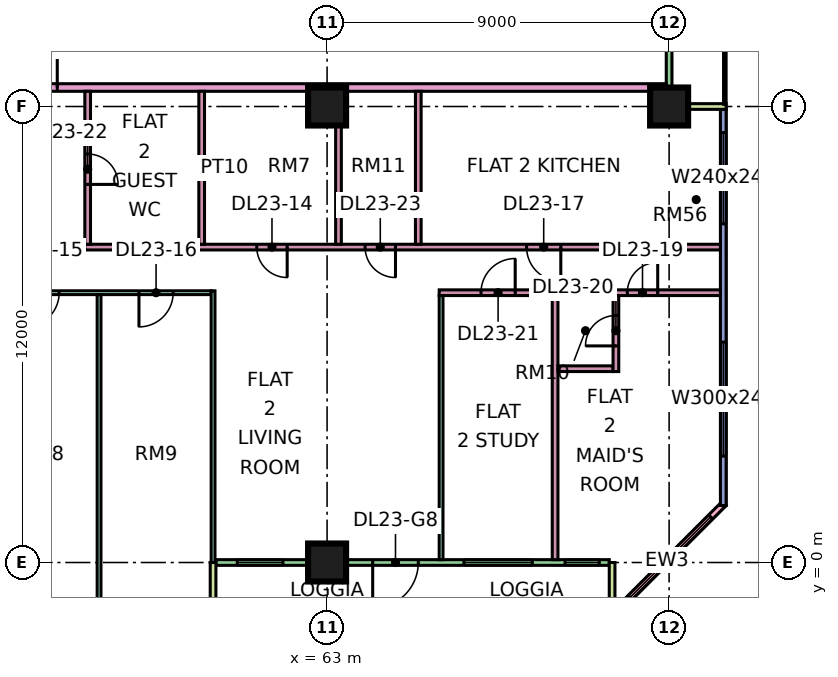
"""IFC4 building model, lengths in metres.
Left out: names, types, materials, properties, quantities, classifications, styles, units other than length and angle.
Written with IfcOpenShell. Run it as: python <this file> out.ifc"""

import sys

from ifc_helpers import new_model, si_unit, direction, frame, frame_2d, origin, origin_2d, place, context, subcontext, project, spatial, rectangle, extrude, element, fill, save


model = new_model("IFC4")
c1 = context("Model", 3, precision=1e-05, world=origin(), true_north=direction((0.0, 1.0)))
c2 = subcontext(c1, "Body", "Model", "MODEL_VIEW")
j1 = project(units=[si_unit("LENGTHUNIT", "METRE"), si_unit("PLANEANGLEUNIT", "RADIAN")], contexts=[c1])
p1 = place(None, origin())
s1 = spatial("IfcSite", under=j1, at=p1, CompositionType="ELEMENT")
p2 = place(p1, origin())
s2 = spatial("IfcBuilding", under=s1, at=p2, CompositionType="ELEMENT")
p3 = place(p2, frame((0.0, 0.0, 103.15)))
s3 = spatial("IfcBuildingStorey", under=s2, at=p3, CompositionType="ELEMENT", Elevation=103.15)
for number, where, z_axis, x_axis in (
    (1, (63.0, 0.0, 0.0), (0.0, 0.0, 1.0), (1.0, 0.0, 0.0)),
    (2, (63.0, 12.0, 0.0), (0.0, 0.0, 1.0), (1.0, 0.0, 0.0)),
    (3, (72.0, 12.0, 0.0), (0.0, 0.0, 1.0), (1.0, 0.0, 0.0)),
):
    element("IfcColumn", number, at=place(p3, frame(where, z_axis=z_axis, x_axis=x_axis)), inside=s3, PredefinedType="COLUMN", context=c2, shape_type="SweptSolid", body=[
        extrude(rectangle(XDim=1.0, YDim=1.0, at=origin_2d()), origin(), (0.0, 0.0, 1.0), 3.75),
    ])
p4 = place(p3, frame((60.075, 0.0, 0.0), z_axis=(0.0, 0.0, 1.0), x_axis=(1.0, 0.0, 0.0)))
e4 = element("IfcWall", 4, at=p4, inside=s3, PredefinedType="SOLIDWALL", context=c2, shape_type="SweptSolid", body=[
    extrude(rectangle(XDim=10.35, YDim=0.15, at=frame_2d((5.175, 0.0))), origin(), (0.0, 0.0, 1.0), 3.35),
])
p5 = place(p4, frame((0.562, 0.0, 0.45)))
e5 = element("IfcOpeningElement", 5, at=p5, cuts=e4, PredefinedType="OPENING", context=c2, shape_type="SweptSolid", body=[
    extrude(rectangle(XDim=1.2, YDim=2.4, at=frame_2d((0.6, 1.2))), frame((0.0, 0.085, 0.0), z_axis=(0.0, -1.0, 0.0), x_axis=(1.0, 0.0, 0.0)), (0.0, 0.0, 1.0), 0.17),
])
p6 = place(p4, frame((4.125, 0.0, 0.0)))
e6 = element("IfcOpeningElement", 6, at=p6, cuts=e4, PredefinedType="OPENING", context=c2, shape_type="SweptSolid", body=[
    extrude(rectangle(XDim=1.2, YDim=2.4, at=frame_2d((0.6, 1.2))), frame((0.0, 0.085, 0.0), z_axis=(0.0, -1.0, 0.0), x_axis=(1.0, 0.0, 0.0)), (0.0, 0.0, 1.0), 0.17),
])
p7 = place(p4, frame((6.525, 0.0, 0.45)))
e7 = element("IfcOpeningElement", 7, at=p7, cuts=e4, PredefinedType="OPENING", context=c2, shape_type="SweptSolid", body=[
    extrude(rectangle(XDim=1.8, YDim=2.4, at=frame_2d((0.9, 1.2))), frame((0.0, 0.085, 0.0), z_axis=(0.0, -1.0, 0.0), x_axis=(1.0, 0.0, 0.0)), (0.0, 0.0, 1.0), 0.17),
])
p8 = place(p4, frame((9.188, 0.0, 0.45)))
e8 = element("IfcOpeningElement", 8, at=p8, cuts=e4, PredefinedType="OPENING", context=c2, shape_type="SweptSolid", body=[
    extrude(rectangle(XDim=0.9, YDim=2.4, at=frame_2d((0.45, 1.2))), frame((0.0, 0.085, 0.0), z_axis=(0.0, -1.0, 0.0), x_axis=(1.0, 0.0, 0.0)), (0.0, 0.0, 1.0), 0.17),
])
for number, where, z_axis, x_axis in (
    (9, (60.0, -1.5, 0.0), (0.0, 0.0, 1.0), (0.0, 1.0, 0.0)),
    (10, (70.5, -1.5, 0.0), (0.0, 0.0, 1.0), (0.0, 1.0, 0.0)),
):
    element("IfcWall", number, at=place(p3, frame(where, z_axis=z_axis, x_axis=x_axis)), inside=s3, PredefinedType="SOLIDWALL", context=c2, shape_type="SweptSolid", body=[
        extrude(rectangle(XDim=1.5, YDim=0.15, at=frame_2d((0.75, 0.0))), origin(), (0.0, 0.0, 1.0), 3.35),
    ])
p9 = place(p3, frame((70.447, -1.447, 0.0), z_axis=(0.0, 0.0, 1.0), x_axis=(0.707106781187, 0.707106781187, 0.0)))
e11 = element("IfcWall", 11, at=p9, inside=s3, PredefinedType="SOLIDWALL", context=c2, shape_type="SweptSolid", body=[
    extrude(rectangle(XDim=4.243, YDim=0.15, at=frame_2d((2.121, 0.0))), origin(), (0.0, 0.0, 1.0), 3.35),
])
p10 = place(p9, frame((0.744, 0.0, 0.45)))
e12 = element("IfcOpeningElement", 12, at=p10, cuts=e11, PredefinedType="OPENING", context=c2, shape_type="SweptSolid", body=[
    extrude(rectangle(XDim=3.0, YDim=2.4, at=frame_2d((1.5, 1.2))), frame((0.0, 0.085, 0.0), z_axis=(0.0, -1.0, 0.0), x_axis=(1.0, 0.0, 0.0)), (0.0, 0.0, 1.0), 0.17),
])
p11 = place(p3, frame((73.425, 1.5, 0.0), z_axis=(0.0, 0.0, 1.0), x_axis=(0.0, 1.0, 0.0)))
e13 = element("IfcWall", 13, at=p11, inside=s3, PredefinedType="SOLIDWALL", context=c2, shape_type="SweptSolid", body=[
    extrude(rectangle(XDim=10.425, YDim=0.15, at=frame_2d((5.212, 0.0))), origin(), (0.0, 0.0, 1.0), 3.35),
])
p12 = place(p11, frame((1.3, 0.0, 0.45)))
e14 = element("IfcOpeningElement", 14, at=p12, cuts=e13, PredefinedType="OPENING", context=c2, shape_type="SweptSolid", body=[
    extrude(rectangle(XDim=3.0, YDim=2.4, at=frame_2d((1.5, 1.2))), frame((0.0, 0.085, 0.0), z_axis=(0.0, -1.0, 0.0), x_axis=(1.0, 0.0, 0.0)), (0.0, 0.0, 1.0), 0.17),
])
p13 = place(p11, frame((7.413, 0.0, 0.45)))
e15 = element("IfcOpeningElement", 15, at=p13, cuts=e13, PredefinedType="OPENING", context=c2, shape_type="SweptSolid", body=[
    extrude(rectangle(XDim=2.4, YDim=2.4, at=frame_2d((1.2, 1.2))), frame((0.0, 0.085, 0.0), z_axis=(0.0, -1.0, 0.0), x_axis=(1.0, 0.0, 0.0)), (0.0, 0.0, 1.0), 0.17),
])
p14 = place(p3, frame((72.0, 12.075, 0.0), z_axis=(0.0, 0.0, 1.0), x_axis=(0.0, 1.0, 0.0)))
e16 = element("IfcWall", 16, at=p14, inside=s3, PredefinedType="SOLIDWALL", context=c2, shape_type="SweptSolid", body=[
    extrude(rectangle(XDim=10.35, YDim=0.15, at=frame_2d((5.175, 0.0))), origin(), (0.0, 0.0, 1.0), 3.35),
])
p15 = place(p14, frame((4.575, 0.0, 0.0)))
e17 = element("IfcOpeningElement", 17, at=p15, cuts=e16, PredefinedType="OPENING", context=c2, shape_type="SweptSolid", body=[
    extrude(rectangle(XDim=1.8, YDim=2.4, at=frame_2d((0.9, 1.2))), frame((0.0, 0.085, 0.0), z_axis=(0.0, -1.0, 0.0), x_axis=(1.0, 0.0, 0.0)), (0.0, 0.0, 1.0), 0.17),
])
p16 = place(p14, frame((7.988, 0.0, 0.45)))
e18 = element("IfcOpeningElement", 18, at=p16, cuts=e16, PredefinedType="OPENING", context=c2, shape_type="SweptSolid", body=[
    extrude(rectangle(XDim=1.8, YDim=2.4, at=frame_2d((0.9, 1.2))), frame((0.0, 0.085, 0.0), z_axis=(0.0, -1.0, 0.0), x_axis=(1.0, 0.0, 0.0)), (0.0, 0.0, 1.0), 0.17),
])
p17 = place(p3, frame((73.5, 12.0, 0.0), z_axis=(0.0, 0.0, 1.0), x_axis=(-1.0, 0.0, 0.0)))
e19 = element("IfcWall", 19, at=p17, inside=s3, PredefinedType="SOLIDWALL", context=c2, shape_type="SweptSolid", body=[
    extrude(rectangle(XDim=1.5, YDim=0.15, at=frame_2d((0.75, 0.0))), origin(), (0.0, 0.0, 1.0), 3.35),
])
p18 = place(p3, frame((40.65, 12.5, 0.0), z_axis=(0.0, 0.0, 1.0), x_axis=(1.0, 0.0, 0.0)))
e20 = element("IfcWall", 20, at=p18, inside=s3, PredefinedType="PARTITIONING", context=c2, shape_type="SweptSolid", body=[
    extrude(rectangle(XDim=31.276, YDim=0.2, at=frame_2d((15.638, 0.0))), origin(), (0.0, 0.0, 1.0), 3.35),
])
p19 = place(p18, frame((14.25, 0.0, 0.0)))
e21 = element("IfcOpeningElement", 21, at=p19, cuts=e20, PredefinedType="OPENING", context=c2, shape_type="SweptSolid", body=[
    extrude(rectangle(XDim=1.0, YDim=2.1, at=frame_2d((0.5, 1.05))), frame((0.0, 0.11, 0.0), z_axis=(0.0, -1.0, 0.0), x_axis=(1.0, 0.0, 0.0)), (0.0, 0.0, 1.0), 0.22),
])
p20 = place(p18, frame((1.05, 0.0, 0.0)))
e22 = element("IfcOpeningElement", 22, at=p20, cuts=e20, PredefinedType="OPENING", context=c2, shape_type="SweptSolid", body=[
    extrude(rectangle(XDim=1.0, YDim=2.1, at=frame_2d((0.5, 1.05))), frame((0.0, 0.11, 0.0), z_axis=(0.0, -1.0, 0.0), x_axis=(1.0, 0.0, 0.0)), (0.0, 0.0, 1.0), 0.22),
])
p21 = place(p3, frame((54.1, 7.1, 0.0), z_axis=(0.0, 0.0, 1.0), x_axis=(1.0, 0.0, 0.0)))
e23 = element("IfcWall", 23, at=p21, inside=s3, PredefinedType="PARTITIONING", context=c2, shape_type="SweptSolid", body=[
    extrude(rectangle(XDim=5.85, YDim=0.1, at=frame_2d((2.925, 0.0))), origin(), (0.0, 0.0, 1.0), 3.35),
])
p22 = place(p21, frame((0.95, 0.0, 0.0)))
e24 = element("IfcOpeningElement", 24, at=p22, cuts=e23, PredefinedType="OPENING", context=c2, shape_type="SweptSolid", body=[
    extrude(rectangle(XDim=0.9, YDim=2.1, at=frame_2d((0.45, 1.05))), frame((0.0, 0.06, 0.0), z_axis=(0.0, -1.0, 0.0), x_axis=(1.0, 0.0, 0.0)), (0.0, 0.0, 1.0), 0.12),
])
p23 = place(p21, frame((3.95, 0.0, 0.0)))
e25 = element("IfcOpeningElement", 25, at=p23, cuts=e23, PredefinedType="OPENING", context=c2, shape_type="SweptSolid", body=[
    extrude(rectangle(XDim=0.9, YDim=2.1, at=frame_2d((0.45, 1.05))), frame((0.0, 0.06, 0.0), z_axis=(0.0, -1.0, 0.0), x_axis=(1.0, 0.0, 0.0)), (0.0, 0.0, 1.0), 0.12),
])
p24 = place(p3, frame((56.625, 8.3, 0.0), z_axis=(0.0, 0.0, 1.0), x_axis=(1.0, 0.0, 0.0)))
e26 = element("IfcWall", 26, at=p24, inside=s3, PredefinedType="PARTITIONING", context=c2, shape_type="SweptSolid", body=[
    extrude(rectangle(XDim=16.725, YDim=0.15, at=frame_2d((8.363, 0.0))), origin(), (0.0, 0.0, 1.0), 3.35),
])
p25 = place(p24, frame((4.525, 0.0, 0.0)))
e27 = element("IfcOpeningElement", 27, at=p25, cuts=e26, PredefinedType="OPENING", context=c2, shape_type="SweptSolid", body=[
    extrude(rectangle(XDim=0.8, YDim=2.1, at=frame_2d((0.4, 1.05))), frame((0.0, 0.085, 0.0), z_axis=(0.0, -1.0, 0.0), x_axis=(1.0, 0.0, 0.0)), (0.0, 0.0, 1.0), 0.17),
])
p26 = place(p24, frame((11.625, 0.0, 0.0)))
e28 = element("IfcOpeningElement", 28, at=p26, cuts=e26, PredefinedType="OPENING", context=c2, shape_type="SweptSolid", body=[
    extrude(rectangle(XDim=0.9, YDim=2.1, at=frame_2d((0.45, 1.05))), frame((0.0, 0.085, 0.0), z_axis=(0.0, -1.0, 0.0), x_axis=(1.0, 0.0, 0.0)), (0.0, 0.0, 1.0), 0.17),
])
p27 = place(p24, frame((7.375, 0.0, 0.0)))
e29 = element("IfcOpeningElement", 29, at=p27, cuts=e26, PredefinedType="OPENING", context=c2, shape_type="SweptSolid", body=[
    extrude(rectangle(XDim=0.8, YDim=2.1, at=frame_2d((0.4, 1.05))), frame((0.0, 0.085, 0.0), z_axis=(0.0, -1.0, 0.0), x_axis=(1.0, 0.0, 0.0)), (0.0, 0.0, 1.0), 0.17),
])
p28 = place(p3, frame((56.7, 8.375, 0.0), z_axis=(0.0, 0.0, 1.0), x_axis=(0.0, 1.0, 0.0)))
e30 = element("IfcWall", 30, at=p28, inside=s3, PredefinedType="PARTITIONING", context=c2, shape_type="SweptSolid", body=[
    extrude(rectangle(XDim=4.025, YDim=0.15, at=frame_2d((2.012, 0.0))), origin(), (0.0, 0.0, 1.0), 3.35),
])
p29 = place(p28, frame((1.575, 0.0, 0.0)))
e31 = element("IfcOpeningElement", 31, at=p29, cuts=e30, PredefinedType="OPENING", context=c2, shape_type="SweptSolid", body=[
    extrude(rectangle(XDim=0.8, YDim=2.1, at=frame_2d((0.4, 1.05))), frame((0.0, 0.085, 0.0), z_axis=(0.0, -1.0, 0.0), x_axis=(1.0, 0.0, 0.0)), (0.0, 0.0, 1.0), 0.17),
])
p30 = place(p3, frame((57.0, -1.351, 0.0), z_axis=(0.0, 0.0, 1.0), x_axis=(0.0, 1.0, 0.0)))
e32 = element("IfcWall", 32, at=p30, inside=s3, PredefinedType="PARTITIONING", context=c2, shape_type="SweptSolid", body=[
    extrude(rectangle(XDim=8.401, YDim=0.1, at=frame_2d((4.201, 0.0))), origin(), (0.0, 0.0, 1.0), 3.35),
])
p31 = place(p3, frame((59.7, 8.375, 0.0), z_axis=(0.0, 0.0, 1.0), x_axis=(0.0, 1.0, 0.0)))
e33 = element("IfcWall", 33, at=p31, inside=s3, PredefinedType="PARTITIONING", context=c2, shape_type="SweptSolid", body=[
    extrude(rectangle(XDim=4.025, YDim=0.15, at=frame_2d((2.012, 0.0))), origin(), (0.0, 0.0, 1.0), 3.35),
])
p32 = place(p3, frame((60.0, 0.0, 0.0), z_axis=(0.0, 0.0, 1.0), x_axis=(0.0, 1.0, 0.0)))
e34 = element("IfcWall", 34, at=p32, inside=s3, PredefinedType="PARTITIONING", context=c2, shape_type="SweptSolid", body=[
    extrude(rectangle(XDim=7.15, YDim=0.1, at=frame_2d((3.575, 0.0))), origin(), (0.0, 0.0, 1.0), 3.35),
])
for number, where, z_axis, x_axis in (
    (35, (63.3, 8.375, 0.0), (0.0, 0.0, 1.0), (0.0, 1.0, 0.0)),
    (36, (65.4, 8.375, 0.0), (0.0, 0.0, 1.0), (0.0, 1.0, 0.0)),
):
    element("IfcWall", number, at=place(p3, frame(where, z_axis=z_axis, x_axis=x_axis)), inside=s3, PredefinedType="PARTITIONING", context=c2, shape_type="SweptSolid", body=[
        extrude(rectangle(XDim=4.025, YDim=0.15, at=frame_2d((2.012, 0.0))), origin(), (0.0, 0.0, 1.0), 3.35),
    ])
p33 = place(p3, frame((65.95, 7.1, 0.0), z_axis=(0.0, 0.0, 1.0), x_axis=(1.0, 0.0, 0.0)))
e37 = element("IfcWall", 37, at=p33, inside=s3, PredefinedType="PARTITIONING", context=c2, shape_type="SweptSolid", body=[
    extrude(rectangle(XDim=7.4, YDim=0.15, at=frame_2d((3.7, 0.0))), origin(), (0.0, 0.0, 1.0), 3.35),
])
p34 = place(p33, frame((4.95, 0.0, 0.0)))
e38 = element("IfcOpeningElement", 38, at=p34, cuts=e37, PredefinedType="OPENING", context=c2, shape_type="SweptSolid", body=[
    extrude(rectangle(XDim=0.8, YDim=2.1, at=frame_2d((0.4, 1.05))), frame((0.0, 0.085, 0.0), z_axis=(0.0, -1.0, 0.0), x_axis=(1.0, 0.0, 0.0)), (0.0, 0.0, 1.0), 0.17),
])
p35 = place(p33, frame((1.1, 0.0, 0.0)))
e39 = element("IfcOpeningElement", 39, at=p35, cuts=e37, PredefinedType="OPENING", context=c2, shape_type="SweptSolid", body=[
    extrude(rectangle(XDim=0.9, YDim=2.1, at=frame_2d((0.45, 1.05))), frame((0.0, 0.085, 0.0), z_axis=(0.0, -1.0, 0.0), x_axis=(1.0, 0.0, 0.0)), (0.0, 0.0, 1.0), 0.17),
])
p36 = place(p3, frame((66.0, 0.074, 0.0), z_axis=(0.0, 0.0, 1.0), x_axis=(0.0, 1.0, 0.0)))
e40 = element("IfcWall", 40, at=p36, inside=s3, PredefinedType="PARTITIONING", context=c2, shape_type="SweptSolid", body=[
    extrude(rectangle(XDim=6.951, YDim=0.1, at=frame_2d((3.476, 0.0))), origin(), (0.0, 0.0, 1.0), 3.35),
])
p37 = place(p3, frame((69.0, 0.074, 0.0), z_axis=(0.0, 0.0, 1.0), x_axis=(0.0, 1.0, 0.0)))
e41 = element("IfcWall", 41, at=p37, inside=s3, PredefinedType="PARTITIONING", context=c2, shape_type="SweptSolid", body=[
    extrude(rectangle(XDim=6.951, YDim=0.15, at=frame_2d((3.476, 0.0))), origin(), (0.0, 0.0, 1.0), 3.35),
])
p38 = place(p3, frame((69.075, 5.1, 0.0), z_axis=(0.0, 0.0, 1.0), x_axis=(1.0, 0.0, 0.0)))
e42 = element("IfcWall", 42, at=p38, inside=s3, PredefinedType="PARTITIONING", context=c2, shape_type="SweptSolid", body=[
    extrude(rectangle(XDim=1.45, YDim=0.15, at=frame_2d((0.725, 0.0))), origin(), (0.0, 0.0, 1.0), 3.35),
])
p39 = place(p3, frame((70.6, 5.025, 0.0), z_axis=(0.0, 0.0, 1.0), x_axis=(0.0, 1.0, 0.0)))
e43 = element("IfcWall", 43, at=p39, inside=s3, PredefinedType="PARTITIONING", context=c2, shape_type="SweptSolid", body=[
    extrude(rectangle(XDim=2.0, YDim=0.15, at=frame_2d((1.0, 0.0))), origin(), (0.0, 0.0, 1.0), 3.35),
])
p40 = place(p39, frame((0.675, 0.0, 0.0)))
e44 = element("IfcOpeningElement", 44, at=p40, cuts=e43, PredefinedType="OPENING", context=c2, shape_type="SweptSolid", body=[
    extrude(rectangle(XDim=0.8, YDim=2.1, at=frame_2d((0.4, 1.05))), frame((0.0, 0.085, 0.0), z_axis=(0.0, -1.0, 0.0), x_axis=(1.0, 0.0, 0.0)), (0.0, 0.0, 1.0), 0.17),
])
p41 = place(p5, origin())
e45 = element("IfcWindow", 45, at=p41, inside=s3, PartitioningType="SINGLE_PANEL", PredefinedType="WINDOW", context=c2, shape_type="SweptSolid", body=[
    extrude(rectangle(XDim=1.2, YDim=2.4, at=frame_2d((0.6, 1.2))), frame((0.0, 0.03, 0.0), z_axis=(0.0, -1.0, 0.0), x_axis=(1.0, 0.0, 0.0)), (0.0, 0.0, 1.0), 0.06),
])
fill(e5, e45)
p42 = place(p6, frame((1.2, 0.0, 0.0), z_axis=(0.0, 0.0, 1.0), x_axis=(-1.0, 0.0, 0.0)))
e46 = element("IfcDoor", 46, at=p42, inside=s3, OperationType="DOUBLE_DOOR_SINGLE_SWING", PredefinedType="DOOR", context=c2, shape_type="SweptSolid", body=[
    extrude(rectangle(XDim=1.2, YDim=2.4, at=frame_2d((0.6, 1.2))), frame((0.0, 0.025, 0.0), z_axis=(0.0, -1.0, 0.0), x_axis=(1.0, 0.0, 0.0)), (0.0, 0.0, 1.0), 0.05),
])
fill(e6, e46)
p43 = place(p7, origin())
e47 = element("IfcWindow", 47, at=p43, inside=s3, PartitioningType="SINGLE_PANEL", PredefinedType="WINDOW", context=c2, shape_type="SweptSolid", body=[
    extrude(rectangle(XDim=1.8, YDim=2.4, at=frame_2d((0.9, 1.2))), frame((0.0, 0.03, 0.0), z_axis=(0.0, -1.0, 0.0), x_axis=(1.0, 0.0, 0.0)), (0.0, 0.0, 1.0), 0.06),
])
fill(e7, e47)
p44 = place(p8, origin())
e48 = element("IfcWindow", 48, at=p44, inside=s3, PartitioningType="SINGLE_PANEL", PredefinedType="WINDOW", context=c2, shape_type="SweptSolid", body=[
    extrude(rectangle(XDim=0.9, YDim=2.4, at=frame_2d((0.45, 1.2))), frame((0.0, 0.03, 0.0), z_axis=(0.0, -1.0, 0.0), x_axis=(1.0, 0.0, 0.0)), (0.0, 0.0, 1.0), 0.06),
])
fill(e8, e48)
p45 = place(p10, origin())
e49 = element("IfcWindow", 49, at=p45, inside=s3, PartitioningType="SINGLE_PANEL", PredefinedType="WINDOW", context=c2, shape_type="SweptSolid", body=[
    extrude(rectangle(XDim=3.0, YDim=2.4, at=frame_2d((1.5, 1.2))), frame((0.0, 0.03, 0.0), z_axis=(0.0, -1.0, 0.0), x_axis=(1.0, 0.0, 0.0)), (0.0, 0.0, 1.0), 0.06),
])
fill(e12, e49)
p46 = place(p12, origin())
e50 = element("IfcWindow", 50, at=p46, inside=s3, PartitioningType="SINGLE_PANEL", PredefinedType="WINDOW", context=c2, shape_type="SweptSolid", body=[
    extrude(rectangle(XDim=3.0, YDim=2.4, at=frame_2d((1.5, 1.2))), frame((0.0, 0.03, 0.0), z_axis=(0.0, -1.0, 0.0), x_axis=(1.0, 0.0, 0.0)), (0.0, 0.0, 1.0), 0.06),
])
fill(e14, e50)
p47 = place(p13, origin())
e51 = element("IfcWindow", 51, at=p47, inside=s3, PartitioningType="SINGLE_PANEL", PredefinedType="WINDOW", context=c2, shape_type="SweptSolid", body=[
    extrude(rectangle(XDim=2.4, YDim=2.4, at=frame_2d((1.2, 1.2))), frame((0.0, 0.03, 0.0), z_axis=(0.0, -1.0, 0.0), x_axis=(1.0, 0.0, 0.0)), (0.0, 0.0, 1.0), 0.06),
])
fill(e15, e51)
p48 = place(p25, origin())
e52 = element("IfcDoor", 52, at=p48, inside=s3, OperationType="SINGLE_SWING_RIGHT", PredefinedType="DOOR", context=c2, shape_type="SweptSolid", body=[
    extrude(rectangle(XDim=0.8, YDim=2.1, at=frame_2d((0.4, 1.05))), frame((0.0, 0.025, 0.0), z_axis=(0.0, -1.0, 0.0), x_axis=(1.0, 0.0, 0.0)), (0.0, 0.0, 1.0), 0.05),
])
fill(e27, e52)
p49 = place(p22, frame((0.9, 0.0, 0.0), z_axis=(0.0, 0.0, 1.0), x_axis=(-1.0, 0.0, 0.0)))
e53 = element("IfcDoor", 53, at=p49, inside=s3, OperationType="SINGLE_SWING_LEFT", PredefinedType="DOOR", context=c2, shape_type="SweptSolid", body=[
    extrude(rectangle(XDim=0.9, YDim=2.1, at=frame_2d((0.45, 1.05))), frame((0.0, 0.025, 0.0), z_axis=(0.0, -1.0, 0.0), x_axis=(1.0, 0.0, 0.0)), (0.0, 0.0, 1.0), 0.05),
])
fill(e24, e53)
p50 = place(p23, frame((0.9, 0.0, 0.0), z_axis=(0.0, 0.0, 1.0), x_axis=(-1.0, 0.0, 0.0)))
e54 = element("IfcDoor", 54, at=p50, inside=s3, OperationType="SINGLE_SWING_LEFT", PredefinedType="DOOR", context=c2, shape_type="SweptSolid", body=[
    extrude(rectangle(XDim=0.9, YDim=2.1, at=frame_2d((0.45, 1.05))), frame((0.0, 0.025, 0.0), z_axis=(0.0, -1.0, 0.0), x_axis=(1.0, 0.0, 0.0)), (0.0, 0.0, 1.0), 0.05),
])
fill(e25, e54)
p51 = place(p26, origin())
e55 = element("IfcDoor", 55, at=p51, inside=s3, OperationType="SINGLE_SWING_RIGHT", PredefinedType="DOOR", context=c2, shape_type="SweptSolid", body=[
    extrude(rectangle(XDim=0.9, YDim=2.1, at=frame_2d((0.45, 1.05))), frame((0.0, 0.025, 0.0), z_axis=(0.0, -1.0, 0.0), x_axis=(1.0, 0.0, 0.0)), (0.0, 0.0, 1.0), 0.05),
])
fill(e28, e55)
p52 = place(p19, frame((1.0, 0.0, 0.0), z_axis=(0.0, 0.0, 1.0), x_axis=(-1.0, 0.0, 0.0)))
e56 = element("IfcDoor", 56, at=p52, inside=s3, OperationType="SINGLE_SWING_RIGHT", PredefinedType="DOOR", context=c2, shape_type="SweptSolid", body=[
    extrude(rectangle(XDim=1.0, YDim=2.1, at=frame_2d((0.5, 1.05))), frame((0.0, 0.025, 0.0), z_axis=(0.0, -1.0, 0.0), x_axis=(1.0, 0.0, 0.0)), (0.0, 0.0, 1.0), 0.05),
])
fill(e21, e56)
p53 = place(p34, frame((0.8, 0.0, 0.0), z_axis=(0.0, 0.0, 1.0), x_axis=(-1.0, 0.0, 0.0)))
e57 = element("IfcDoor", 57, at=p53, inside=s3, OperationType="SINGLE_SWING_RIGHT", PredefinedType="DOOR", context=c2, shape_type="SweptSolid", body=[
    extrude(rectangle(XDim=0.8, YDim=2.1, at=frame_2d((0.4, 1.05))), frame((0.0, 0.025, 0.0), z_axis=(0.0, -1.0, 0.0), x_axis=(1.0, 0.0, 0.0)), (0.0, 0.0, 1.0), 0.05),
])
fill(e38, e57)
p54 = place(p40, origin())
e58 = element("IfcDoor", 58, at=p54, inside=s3, OperationType="SINGLE_SWING_LEFT", PredefinedType="DOOR", context=c2, shape_type="SweptSolid", body=[
    extrude(rectangle(XDim=0.8, YDim=2.1, at=frame_2d((0.4, 1.05))), frame((0.0, 0.025, 0.0), z_axis=(0.0, -1.0, 0.0), x_axis=(1.0, 0.0, 0.0)), (0.0, 0.0, 1.0), 0.05),
])
fill(e44, e58)
p55 = place(p35, frame((0.9, 0.0, 0.0), z_axis=(0.0, 0.0, 1.0), x_axis=(-1.0, 0.0, 0.0)))
e59 = element("IfcDoor", 59, at=p55, inside=s3, OperationType="SINGLE_SWING_RIGHT", PredefinedType="DOOR", context=c2, shape_type="SweptSolid", body=[
    extrude(rectangle(XDim=0.9, YDim=2.1, at=frame_2d((0.45, 1.05))), frame((0.0, 0.025, 0.0), z_axis=(0.0, -1.0, 0.0), x_axis=(1.0, 0.0, 0.0)), (0.0, 0.0, 1.0), 0.05),
])
fill(e39, e59)
p56 = place(p29, frame((0.8, 0.0, 0.0), z_axis=(0.0, 0.0, 1.0), x_axis=(-1.0, 0.0, 0.0)))
e60 = element("IfcDoor", 60, at=p56, inside=s3, OperationType="SINGLE_SWING_LEFT", PredefinedType="DOOR", context=c2, shape_type="SweptSolid", body=[
    extrude(rectangle(XDim=0.8, YDim=2.1, at=frame_2d((0.4, 1.05))), frame((0.0, 0.025, 0.0), z_axis=(0.0, -1.0, 0.0), x_axis=(1.0, 0.0, 0.0)), (0.0, 0.0, 1.0), 0.05),
])
fill(e31, e60)
p57 = place(p27, origin())
e61 = element("IfcDoor", 61, at=p57, inside=s3, OperationType="SINGLE_SWING_RIGHT", PredefinedType="DOOR", context=c2, shape_type="SweptSolid", body=[
    extrude(rectangle(XDim=0.8, YDim=2.1, at=frame_2d((0.4, 1.05))), frame((0.0, 0.025, 0.0), z_axis=(0.0, -1.0, 0.0), x_axis=(1.0, 0.0, 0.0)), (0.0, 0.0, 1.0), 0.05),
])
fill(e29, e61)
save(model, sys.argv[1])
